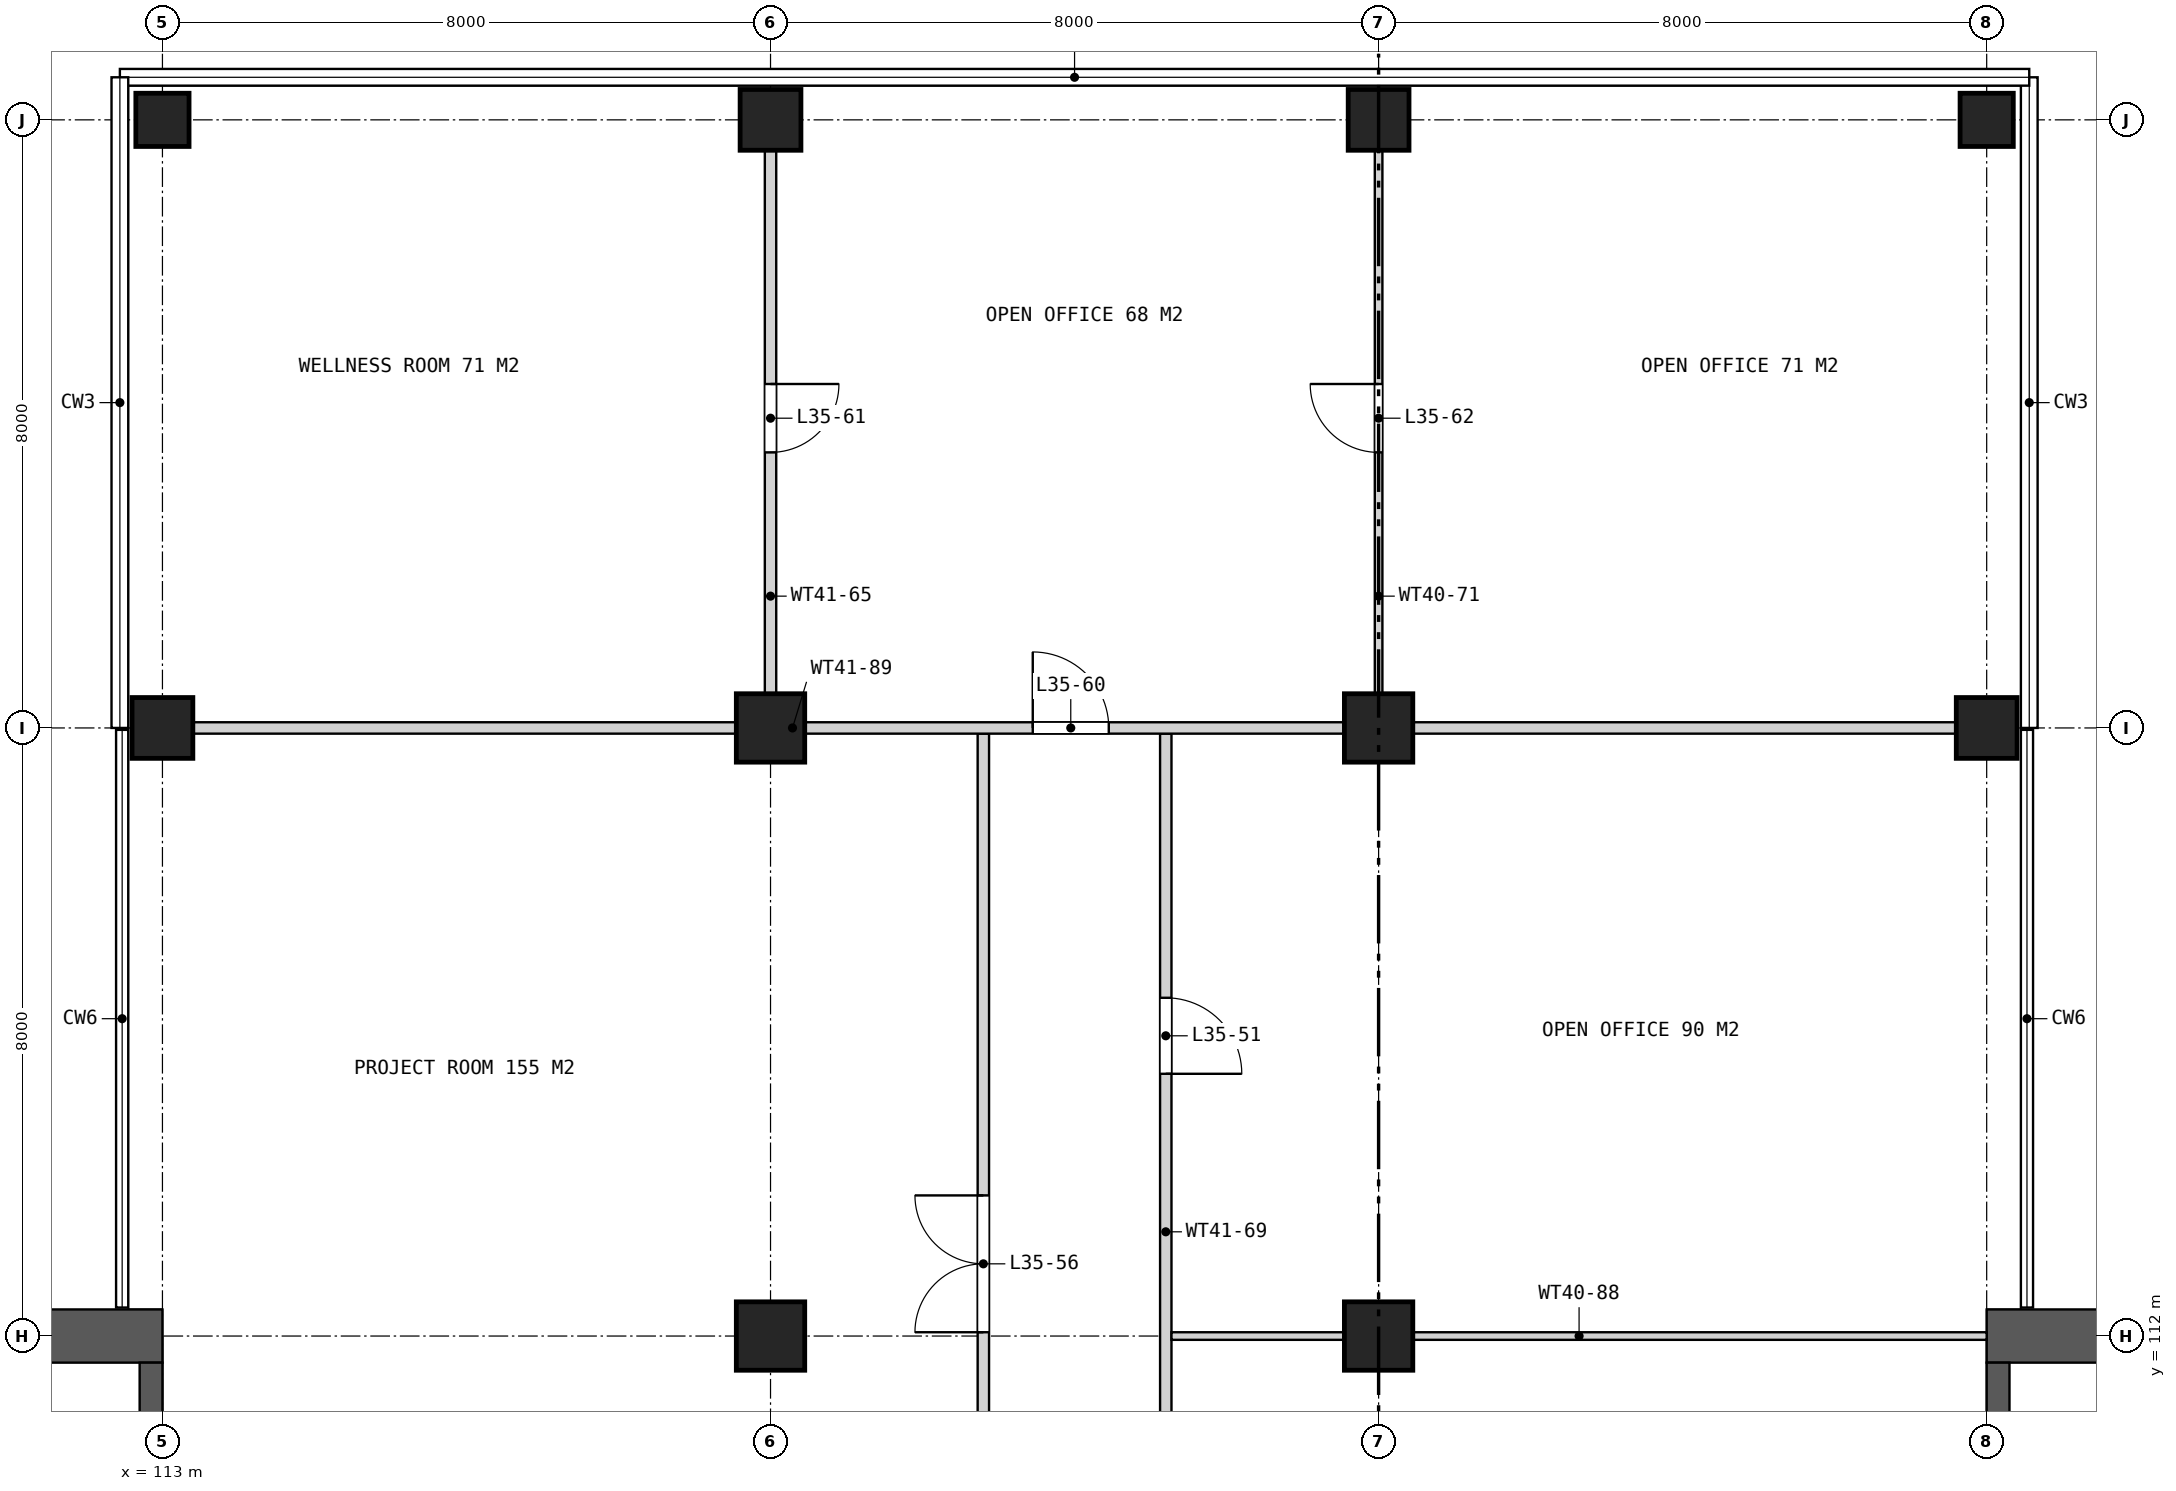
"""IFC4 building model, lengths in metres.
Left out: names, types, materials, properties, quantities, classifications, styles, units other than length and angle.
Written with IfcOpenShell. Run it as: python <this file> out.ifc"""

import sys

from ifc_helpers import new_model, si_unit, direction, frame, frame_2d, origin, origin_2d, place, context, subcontext, project, spatial, rectangle, extrude, element, fill, save


model = new_model("IFC4")
c1 = context("Model", 3, precision=1e-05, world=origin(), true_north=direction((0.0, 1.0)))
c2 = subcontext(c1, "Body", "Model", "MODEL_VIEW")
j1 = project(units=[si_unit("LENGTHUNIT", "METRE"), si_unit("PLANEANGLEUNIT", "RADIAN")], contexts=[c1])
p1 = place(None, origin())
s1 = spatial("IfcSite", under=j1, at=p1, CompositionType="ELEMENT")
p2 = place(p1, origin())
s2 = spatial("IfcBuilding", under=s1, at=p2, CompositionType="ELEMENT")
p3 = place(p2, frame((0.0, 0.0, 167.3)))
s3 = spatial("IfcBuildingStorey", under=s2, at=p3, CompositionType="ELEMENT", Elevation=167.3)
p4 = place(p3, frame((113.0, 120.0, 0.0), z_axis=(0.0, 0.0, 1.0), x_axis=(1.0, 0.0, 0.0)))
e1 = element("IfcColumn", 1, at=p4, inside=s3, PredefinedType="COLUMN", context=c2, shape_type="SweptSolid", body=[
    extrude(rectangle(XDim=0.8, YDim=0.8, at=origin_2d()), origin(), (0.0, 0.0, 1.0), 4.2),
])
p5 = place(p3, frame((113.0, 128.0, 0.0), z_axis=(0.0, 0.0, 1.0), x_axis=(1.0, 0.0, 0.0)))
e2 = element("IfcColumn", 2, at=p5, inside=s3, PredefinedType="COLUMN", context=c2, shape_type="SweptSolid", body=[
    extrude(rectangle(XDim=0.7, YDim=0.7, at=origin_2d()), origin(), (0.0, 0.0, 1.0), 4.2),
])
for number, where, z_axis, x_axis in (
    (3, (121.0, 112.0, 0.0), (0.0, 0.0, 1.0), (1.0, 0.0, 0.0)),
    (4, (121.0, 120.0, 0.0), (0.0, 0.0, 1.0), (1.0, 0.0, 0.0)),
):
    element("IfcColumn", number, at=place(p3, frame(where, z_axis=z_axis, x_axis=x_axis)), inside=s3, PredefinedType="COLUMN", context=c2, shape_type="SweptSolid", body=[
        extrude(rectangle(XDim=0.9, YDim=0.9, at=origin_2d()), origin(), (0.0, 0.0, 1.0), 4.2),
    ])
p6 = place(p3, frame((121.0, 128.0, 0.0), z_axis=(0.0, 0.0, 1.0), x_axis=(1.0, 0.0, 0.0)))
e5 = element("IfcColumn", 5, at=p6, inside=s3, PredefinedType="COLUMN", context=c2, shape_type="SweptSolid", body=[
    extrude(rectangle(XDim=0.8, YDim=0.8, at=origin_2d()), origin(), (0.0, 0.0, 1.0), 4.2),
])
for number, where, z_axis, x_axis in (
    (6, (129.0, 112.0, 0.0), (0.0, 0.0, 1.0), (1.0, 0.0, 0.0)),
    (7, (129.0, 120.0, 0.0), (0.0, 0.0, 1.0), (1.0, 0.0, 0.0)),
):
    element("IfcColumn", number, at=place(p3, frame(where, z_axis=z_axis, x_axis=x_axis)), inside=s3, PredefinedType="COLUMN", context=c2, shape_type="SweptSolid", body=[
        extrude(rectangle(XDim=0.9, YDim=0.9, at=origin_2d()), origin(), (0.0, 0.0, 1.0), 4.2),
    ])
for number, where, z_axis, x_axis in (
    (8, (129.0, 128.0, 0.0), (0.0, 0.0, 1.0), (1.0, 0.0, 0.0)),
    (9, (137.0, 120.0, 0.0), (0.0, 0.0, 1.0), (1.0, 0.0, 0.0)),
):
    element("IfcColumn", number, at=place(p3, frame(where, z_axis=z_axis, x_axis=x_axis)), inside=s3, PredefinedType="COLUMN", context=c2, shape_type="SweptSolid", body=[
        extrude(rectangle(XDim=0.8, YDim=0.8, at=origin_2d()), origin(), (0.0, 0.0, 1.0), 4.2),
    ])
p7 = place(p3, frame((137.0, 128.0, 0.0), z_axis=(0.0, 0.0, 1.0), x_axis=(1.0, 0.0, 0.0)))
e10 = element("IfcColumn", 10, at=p7, inside=s3, PredefinedType="COLUMN", context=c2, shape_type="SweptSolid", body=[
    extrude(rectangle(XDim=0.7, YDim=0.7, at=origin_2d()), origin(), (0.0, 0.0, 1.0), 4.2),
])
p8 = place(p3, frame((137.0, 112.0, 0.0), z_axis=(0.0, 0.0, 1.0), x_axis=(1.0, 0.0, 0.0)))
e11 = element("IfcWall", 11, at=p8, inside=s3, PredefinedType="SHEAR", context=c2, shape_type="SweptSolid", body=[
    extrude(rectangle(XDim=7.1, YDim=0.7, at=frame_2d((3.55, 0.0))), origin(), (0.0, 0.0, 1.0), 4.2),
])
p9 = place(p3, frame((137.15, 105.7, 0.0), z_axis=(0.0, 0.0, 1.0), x_axis=(0.0, 1.0, 0.0)))
e12 = element("IfcWall", 12, at=p9, inside=s3, PredefinedType="SHEAR", context=c2, shape_type="SweptSolid", body=[
    extrude(rectangle(XDim=5.95, YDim=0.3, at=frame_2d((2.975, 0.0))), origin(), (0.0, 0.0, 1.0), 4.2),
])
p10 = place(p3, frame((113.0, 112.0, 0.0), z_axis=(0.0, 0.0, 1.0), x_axis=(-1.0, 0.0, 0.0)))
e13 = element("IfcWall", 13, at=p10, inside=s3, PredefinedType="SHEAR", context=c2, shape_type="SweptSolid", body=[
    extrude(rectangle(XDim=7.1, YDim=0.7, at=frame_2d((3.55, 0.0))), origin(), (0.0, 0.0, 1.0), 4.2),
])
p11 = place(p3, frame((112.85, 111.65, 0.0), z_axis=(0.0, 0.0, 1.0), x_axis=(0.0, -1.0, 0.0)))
e14 = element("IfcWall", 14, at=p11, inside=s3, PredefinedType="SHEAR", context=c2, shape_type="SweptSolid", body=[
    extrude(rectangle(XDim=5.95, YDim=0.3, at=frame_2d((2.975, 0.0))), origin(), (0.0, 0.0, 1.0), 4.2),
])
p12 = place(p3, frame((121.0, 120.075, 0.0), z_axis=(0.0, 0.0, 1.0), x_axis=(0.0, 1.0, 0.0)))
e15 = element("IfcWall", 15, at=p12, inside=s3, PredefinedType="PARTITIONING", context=c2, shape_type="SweptSolid", body=[
    extrude(rectangle(XDim=8.295, YDim=0.15, at=frame_2d((4.147, 0.0))), origin(), (0.0, 0.0, 1.0), 3.26),
])
p13 = place(p12, frame((3.55, 0.0, 0.0)))
e16 = element("IfcOpeningElement", 16, at=p13, cuts=e15, PredefinedType="OPENING", context=c2, shape_type="SweptSolid", body=[
    extrude(rectangle(XDim=0.9, YDim=2.1, at=frame_2d((0.45, 1.05))), frame((0.0, 0.085, 0.0), z_axis=(0.0, -1.0, 0.0), x_axis=(1.0, 0.0, 0.0)), (0.0, 0.0, 1.0), 0.17),
])
p14 = place(p3, frame((123.8, 101.2, 0.0), z_axis=(0.0, 0.0, 1.0), x_axis=(0.0, 1.0, 0.0)))
e17 = element("IfcWall", 17, at=p14, inside=s3, PredefinedType="PARTITIONING", context=c2, shape_type="SweptSolid", body=[
    extrude(rectangle(XDim=18.725, YDim=0.15, at=frame_2d((9.363, 0.0))), origin(), (0.0, 0.0, 1.0), 3.26),
])
p15 = place(p14, frame((0.75, 0.0, 0.0)))
e18 = element("IfcOpeningElement", 18, at=p15, cuts=e17, PredefinedType="OPENING", context=c2, shape_type="SweptSolid", body=[
    extrude(rectangle(XDim=1.0, YDim=2.1, at=frame_2d((0.5, 1.05))), frame((0.0, 0.085, 0.0), z_axis=(0.0, -1.0, 0.0), x_axis=(1.0, 0.0, 0.0)), (0.0, 0.0, 1.0), 0.17),
])
p16 = place(p14, frame((3.05, 0.0, 0.0)))
e19 = element("IfcOpeningElement", 19, at=p16, cuts=e17, PredefinedType="OPENING", context=c2, shape_type="SweptSolid", body=[
    extrude(rectangle(XDim=1.0, YDim=2.1, at=frame_2d((0.5, 1.05))), frame((0.0, 0.085, 0.0), z_axis=(0.0, -1.0, 0.0), x_axis=(1.0, 0.0, 0.0)), (0.0, 0.0, 1.0), 0.17),
])
p17 = place(p14, frame((10.85, 0.0, 0.0)))
e20 = element("IfcOpeningElement", 20, at=p17, cuts=e17, PredefinedType="OPENING", context=c2, shape_type="SweptSolid", body=[
    extrude(rectangle(XDim=1.8, YDim=2.1, at=frame_2d((0.9, 1.05))), frame((0.0, 0.085, 0.0), z_axis=(0.0, -1.0, 0.0), x_axis=(1.0, 0.0, 0.0)), (0.0, 0.0, 1.0), 0.17),
])
p18 = place(p3, frame((126.2, 101.2, 0.0), z_axis=(0.0, 0.0, 1.0), x_axis=(0.0, 1.0, 0.0)))
e21 = element("IfcWall", 21, at=p18, inside=s3, PredefinedType="PARTITIONING", context=c2, shape_type="SweptSolid", body=[
    extrude(rectangle(XDim=18.725, YDim=0.15, at=frame_2d((9.363, 0.0))), origin(), (0.0, 0.0, 1.0), 3.26),
])
p19 = place(p18, frame((7.35, 0.0, 0.0)))
e22 = element("IfcOpeningElement", 22, at=p19, cuts=e21, PredefinedType="OPENING", context=c2, shape_type="SweptSolid", body=[
    extrude(rectangle(XDim=1.0, YDim=2.1, at=frame_2d((0.5, 1.05))), frame((0.0, 0.085, 0.0), z_axis=(0.0, -1.0, 0.0), x_axis=(1.0, 0.0, 0.0)), (0.0, 0.0, 1.0), 0.17),
])
p20 = place(p18, frame((14.25, 0.0, 0.0)))
e23 = element("IfcOpeningElement", 23, at=p20, cuts=e21, PredefinedType="OPENING", context=c2, shape_type="SweptSolid", body=[
    extrude(rectangle(XDim=1.0, YDim=2.1, at=frame_2d((0.5, 1.05))), frame((0.0, 0.085, 0.0), z_axis=(0.0, -1.0, 0.0), x_axis=(1.0, 0.0, 0.0)), (0.0, 0.0, 1.0), 0.17),
])
p21 = place(p3, frame((129.0, 120.075, 0.0), z_axis=(0.0, 0.0, 1.0), x_axis=(0.0, 1.0, 0.0)))
e24 = element("IfcWall", 24, at=p21, inside=s3, PredefinedType="PARTITIONING", context=c2, shape_type="SweptSolid", body=[
    extrude(rectangle(XDim=8.295, YDim=0.1, at=frame_2d((4.147, 0.0))), origin(), (0.0, 0.0, 1.0), 3.26),
])
p22 = place(p21, frame((3.55, 0.0, 0.0)))
e25 = element("IfcOpeningElement", 25, at=p22, cuts=e24, PredefinedType="OPENING", context=c2, shape_type="SweptSolid", body=[
    extrude(rectangle(XDim=0.9, YDim=2.1, at=frame_2d((0.45, 1.05))), frame((0.0, 0.06, 0.0), z_axis=(0.0, -1.0, 0.0), x_axis=(1.0, 0.0, 0.0)), (0.0, 0.0, 1.0), 0.12),
])
p23 = place(p3, frame((126.275, 112.0, 0.0), z_axis=(0.0, 0.0, 1.0), x_axis=(1.0, 0.0, 0.0)))
e26 = element("IfcWall", 26, at=p23, inside=s3, PredefinedType="PARTITIONING", context=c2, shape_type="SweptSolid", body=[
    extrude(rectangle(XDim=10.725, YDim=0.1, at=frame_2d((5.363, 0.0))), origin(), (0.0, 0.0, 1.0), 3.26),
])
p24 = place(p3, frame((112.63, 120.0, 0.0), z_axis=(0.0, 0.0, 1.0), x_axis=(1.0, 0.0, 0.0)))
e27 = element("IfcWall", 27, at=p24, inside=s3, PredefinedType="PARTITIONING", context=c2, shape_type="SweptSolid", body=[
    extrude(rectangle(XDim=24.74, YDim=0.15, at=frame_2d((12.37, 0.0))), origin(), (0.0, 0.0, 1.0), 3.26),
])
p25 = place(p24, frame((11.82, 0.0, 0.0)))
e28 = element("IfcOpeningElement", 28, at=p25, cuts=e27, PredefinedType="OPENING", context=c2, shape_type="SweptSolid", body=[
    extrude(rectangle(XDim=1.0, YDim=2.1, at=frame_2d((0.5, 1.05))), frame((0.0, 0.085, 0.0), z_axis=(0.0, -1.0, 0.0), x_axis=(1.0, 0.0, 0.0)), (0.0, 0.0, 1.0), 0.17),
])
p26 = place(p20, frame((1.0, 0.0, 0.0), z_axis=(0.0, 0.0, 1.0), x_axis=(-1.0, 0.0, 0.0)))
e29 = element("IfcDoor", 29, at=p26, inside=s3, OperationType="SINGLE_SWING_RIGHT", PredefinedType="DOOR", context=c2, shape_type="SweptSolid", body=[
    extrude(rectangle(XDim=1.0, YDim=2.1, at=frame_2d((0.5, 1.05))), frame((0.0, 0.025, 0.0), z_axis=(0.0, -1.0, 0.0), x_axis=(1.0, 0.0, 0.0)), (0.0, 0.0, 1.0), 0.05),
])
fill(e23, e29)
p27 = place(p17, origin())
e30 = element("IfcDoor", 30, at=p27, inside=s3, OperationType="DOUBLE_DOOR_SINGLE_SWING", PredefinedType="DOOR", context=c2, shape_type="SweptSolid", body=[
    extrude(rectangle(XDim=1.8, YDim=2.1, at=frame_2d((0.9, 1.05))), frame((0.0, 0.025, 0.0), z_axis=(0.0, -1.0, 0.0), x_axis=(1.0, 0.0, 0.0)), (0.0, 0.0, 1.0), 0.05),
])
fill(e20, e30)
p28 = place(p25, origin())
e31 = element("IfcDoor", 31, at=p28, inside=s3, OperationType="SINGLE_SWING_LEFT", PredefinedType="DOOR", context=c2, shape_type="SweptSolid", body=[
    extrude(rectangle(XDim=1.0, YDim=2.1, at=frame_2d((0.5, 1.05))), frame((0.0, 0.025, 0.0), z_axis=(0.0, -1.0, 0.0), x_axis=(1.0, 0.0, 0.0)), (0.0, 0.0, 1.0), 0.05),
])
fill(e28, e31)
p29 = place(p13, frame((0.9, 0.0, 0.0), z_axis=(0.0, 0.0, 1.0), x_axis=(-1.0, 0.0, 0.0)))
e32 = element("IfcDoor", 32, at=p29, inside=s3, OperationType="SINGLE_SWING_LEFT", PredefinedType="DOOR", context=c2, shape_type="SweptSolid", body=[
    extrude(rectangle(XDim=0.9, YDim=2.1, at=frame_2d((0.45, 1.05))), frame((0.0, 0.025, 0.0), z_axis=(0.0, -1.0, 0.0), x_axis=(1.0, 0.0, 0.0)), (0.0, 0.0, 1.0), 0.05),
])
fill(e16, e32)
p30 = place(p22, origin())
e33 = element("IfcDoor", 33, at=p30, inside=s3, OperationType="SINGLE_SWING_RIGHT", PredefinedType="DOOR", context=c2, shape_type="SweptSolid", body=[
    extrude(rectangle(XDim=0.9, YDim=2.1, at=frame_2d((0.45, 1.05))), frame((0.0, 0.025, 0.0), z_axis=(0.0, -1.0, 0.0), x_axis=(1.0, 0.0, 0.0)), (0.0, 0.0, 1.0), 0.05),
])
fill(e25, e33)
save(model, sys.argv[1])
